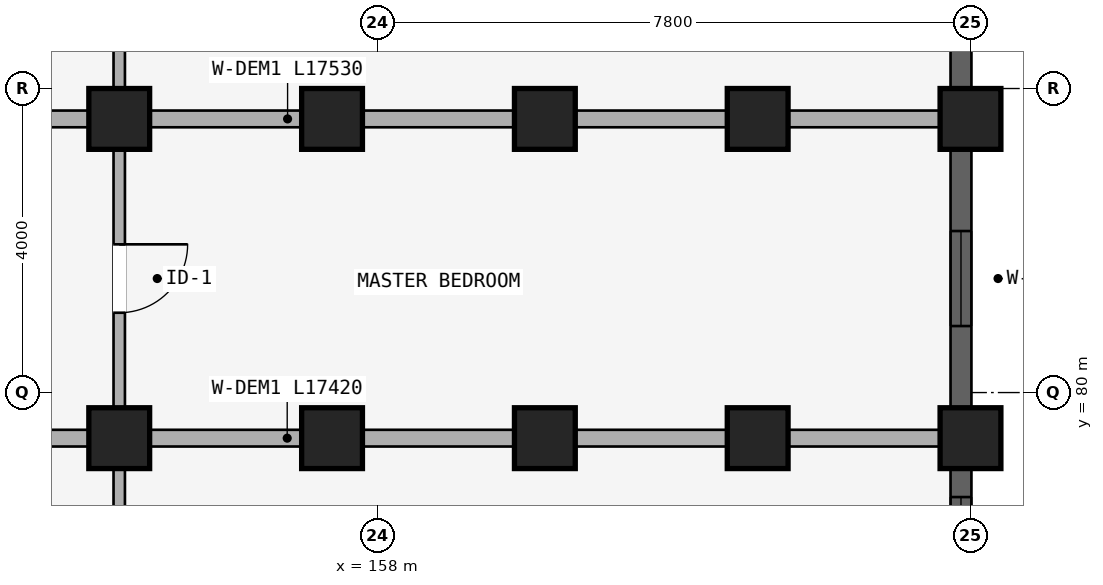
"""IFC4 building model, lengths in metres.
Left out: names, types, materials, properties, quantities, classifications, styles, units other than length and angle.
Written with IfcOpenShell. Run it as: python <this file> out.ifc"""

import sys

from ifc_helpers import new_model, si_unit, direction, frame, frame_2d, origin, origin_2d, place, context, subcontext, project, spatial, rectangle, extrude, element, fill, save


model = new_model("IFC4")
c1 = context("Model", 3, precision=1e-05, world=origin(), true_north=direction((0.0, 1.0)))
c2 = subcontext(c1, "Body", "Model", "MODEL_VIEW")
j1 = project(units=[si_unit("LENGTHUNIT", "METRE"), si_unit("PLANEANGLEUNIT", "RADIAN")], contexts=[c1])
p1 = place(None, origin())
s1 = spatial("IfcSite", under=j1, at=p1, CompositionType="ELEMENT")
p2 = place(p1, origin())
s2 = spatial("IfcBuilding", under=s1, at=p2, CompositionType="ELEMENT")
p3 = place(p2, frame((0.0, 0.0, 11.85)))
s3 = spatial("IfcBuildingStorey", under=s2, at=p3, CompositionType="ELEMENT", Elevation=11.85)
for number, where, z_axis, x_axis in (
    (1, (154.6, 83.6, 0.0), (0.0, 0.0, 1.0), (1.0, 0.0, 0.0)),
    (2, (157.4, 83.6, 0.0), (0.0, 0.0, 1.0), (1.0, 0.0, 0.0)),
    (3, (160.2, 83.6, 0.0), (0.0, 0.0, 1.0), (1.0, 0.0, 0.0)),
    (4, (163.0, 83.6, 0.0), (0.0, 0.0, 1.0), (1.0, 0.0, 0.0)),
    (5, (165.8, 83.6, 0.0), (0.0, 0.0, 1.0), (1.0, 0.0, 0.0)),
    (6, (154.6, 79.4, 0.0), (0.0, 0.0, 1.0), (1.0, 0.0, 0.0)),
    (7, (157.4, 79.4, 0.0), (0.0, 0.0, 1.0), (1.0, 0.0, 0.0)),
    (8, (160.2, 79.4, 0.0), (0.0, 0.0, 1.0), (1.0, 0.0, 0.0)),
    (9, (163.0, 79.4, 0.0), (0.0, 0.0, 1.0), (1.0, 0.0, 0.0)),
    (10, (165.8, 79.4, 0.0), (0.0, 0.0, 1.0), (1.0, 0.0, 0.0)),
):
    element("IfcColumn", number, at=place(p3, frame(where, z_axis=z_axis, x_axis=x_axis)), inside=s3, PredefinedType="COLUMN", context=c2, shape_type="SweptSolid", body=[
        extrude(rectangle(XDim=0.8, YDim=0.8, at=origin_2d()), origin(), (0.0, 0.0, 1.0), 2.93),
    ])
p4 = place(p3, frame((154.6, 87.57, 0.0), z_axis=(0.0, 0.0, 1.0), x_axis=(0.0, -1.0, 0.0)))
e11 = element("IfcWall", 11, at=p4, inside=s3, PredefinedType="PARTITIONING", context=c2, shape_type="SweptSolid", body=[
    extrude(rectangle(XDim=3.89, YDim=0.15, at=frame_2d((1.945, 0.0))), origin(), (0.0, 0.0, 1.0), 2.372),
])
p5 = place(p4, frame((1.495, 0.0, 0.0)))
e12 = element("IfcOpeningElement", 12, at=p5, cuts=e11, PredefinedType="OPENING", context=c2, shape_type="SweptSolid", body=[
    extrude(rectangle(XDim=0.9, YDim=2.1, at=frame_2d((0.45, 1.05))), frame((0.0, 0.085, 0.0), z_axis=(0.0, -1.0, 0.0), x_axis=(1.0, 0.0, 0.0)), (0.0, 0.0, 1.0), 0.17),
])
p6 = place(p3, frame((154.6, 83.52, 0.0), z_axis=(0.0, 0.0, 1.0), x_axis=(0.0, -1.0, 0.0)))
e13 = element("IfcWall", 13, at=p6, inside=s3, PredefinedType="PARTITIONING", context=c2, shape_type="SweptSolid", body=[
    extrude(rectangle(XDim=4.04, YDim=0.15, at=frame_2d((2.02, 0.0))), origin(), (0.0, 0.0, 1.0), 2.372),
])
p7 = place(p6, frame((1.57, 0.0, 0.0)))
e14 = element("IfcOpeningElement", 14, at=p7, cuts=e13, PredefinedType="OPENING", context=c2, shape_type="SweptSolid", body=[
    extrude(rectangle(XDim=0.9, YDim=2.1, at=frame_2d((0.45, 1.05))), frame((0.0, 0.085, 0.0), z_axis=(0.0, -1.0, 0.0), x_axis=(1.0, 0.0, 0.0)), (0.0, 0.0, 1.0), 0.17),
])
p8 = place(p3, frame((148.05, 83.6, 0.0), z_axis=(0.0, 0.0, 1.0), x_axis=(1.0, 0.0, 0.0)))
e15 = element("IfcWall", 15, at=p8, inside=s3, PredefinedType="STANDARD", context=c2, shape_type="SweptSolid", body=[
    extrude(rectangle(XDim=17.53, YDim=0.22, at=frame_2d((8.765, 0.0))), origin(), (0.0, 0.0, 1.0), 2.372),
])
p9 = place(p3, frame((154.6, 79.32, 0.0), z_axis=(0.0, 0.0, 1.0), x_axis=(0.0, -1.0, 0.0)))
e16 = element("IfcWall", 16, at=p9, inside=s3, PredefinedType="PLUMBINGWALL", context=c2, shape_type="SweptSolid", body=[
    extrude(rectangle(XDim=2.64, YDim=0.15, at=frame_2d((1.32, 0.0))), origin(), (0.0, 0.0, 1.0), 2.372),
])
p10 = place(p9, frame((0.87, 0.0, 0.0)))
e17 = element("IfcOpeningElement", 17, at=p10, cuts=e16, PredefinedType="OPENING", context=c2, shape_type="SweptSolid", body=[
    extrude(rectangle(XDim=0.9, YDim=2.1, at=frame_2d((0.45, 1.05))), frame((0.0, 0.085, 0.0), z_axis=(0.0, -1.0, 0.0), x_axis=(1.0, 0.0, 0.0)), (0.0, 0.0, 1.0), 0.17),
])
p11 = place(p3, frame((148.1, 79.4, 0.0), z_axis=(0.0, 0.0, 1.0), x_axis=(1.0, 0.0, 0.0)))
e18 = element("IfcWall", 18, at=p11, inside=s3, PredefinedType="STANDARD", context=c2, shape_type="SweptSolid", body=[
    extrude(rectangle(XDim=17.42, YDim=0.22, at=frame_2d((8.71, 0.0))), origin(), (0.0, 0.0, 1.0), 2.372),
])
p12 = place(p3, frame((165.675, 87.396, 0.0), z_axis=(0.0, 0.0, 1.0), x_axis=(0.0, -1.0, 0.0)))
e19 = element("IfcWall", 19, at=p12, inside=s3, PredefinedType="STANDARD", context=c2, shape_type="SweptSolid", body=[
    extrude(rectangle(XDim=3.393, YDim=0.275, at=frame_2d((1.697, 0.0))), origin(), (0.0, 0.0, 1.0), 2.472),
])
p13 = place(p12, frame((1.072, 0.0, 0.722)))
e20 = element("IfcOpeningElement", 20, at=p13, cuts=e19, PredefinedType="OPENING", context=c2, shape_type="SweptSolid", body=[
    extrude(rectangle(XDim=1.25, YDim=1.55, at=frame_2d((0.625, 0.775))), frame((0.0, 0.147, 0.0), z_axis=(0.0, -1.0, 0.0), x_axis=(1.0, 0.0, 0.0)), (0.0, 0.0, 1.0), 0.295),
])
p14 = place(p3, frame((165.675, 83.197, 0.0), z_axis=(0.0, 0.0, 1.0), x_axis=(0.0, -1.0, 0.0)))
e21 = element("IfcWall", 21, at=p14, inside=s3, PredefinedType="STANDARD", context=c2, shape_type="SweptSolid", body=[
    extrude(rectangle(XDim=3.393, YDim=0.275, at=frame_2d((1.697, 0.0))), origin(), (0.0, 0.0, 1.0), 2.472),
])
p15 = place(p14, frame((1.072, 0.0, 0.722)))
e22 = element("IfcOpeningElement", 22, at=p15, cuts=e21, PredefinedType="OPENING", context=c2, shape_type="SweptSolid", body=[
    extrude(rectangle(XDim=1.25, YDim=1.55, at=frame_2d((0.625, 0.775))), frame((0.0, 0.147, 0.0), z_axis=(0.0, -1.0, 0.0), x_axis=(1.0, 0.0, 0.0)), (0.0, 0.0, 1.0), 0.295),
])
p16 = place(p3, frame((165.675, 78.997, 0.0), z_axis=(0.0, 0.0, 1.0), x_axis=(0.0, -1.0, 0.0)))
e23 = element("IfcWall", 23, at=p16, inside=s3, PredefinedType="STANDARD", context=c2, shape_type="SweptSolid", body=[
    extrude(rectangle(XDim=1.993, YDim=0.275, at=frame_2d((0.997, 0.0))), origin(), (0.0, 0.0, 1.0), 2.472),
])
p17 = place(p16, frame((0.372, 0.0, 0.722)))
e24 = element("IfcOpeningElement", 24, at=p17, cuts=e23, PredefinedType="OPENING", context=c2, shape_type="SweptSolid", body=[
    extrude(rectangle(XDim=1.25, YDim=1.55, at=frame_2d((0.625, 0.775))), frame((0.0, 0.147, 0.0), z_axis=(0.0, -1.0, 0.0), x_axis=(1.0, 0.0, 0.0)), (0.0, 0.0, 1.0), 0.295),
])
p18 = place(p15, origin())
e25 = element("IfcWindow", 25, at=p18, inside=s3, PartitioningType="SINGLE_PANEL", PredefinedType="WINDOW", context=c2, shape_type="SweptSolid", body=[
    extrude(rectangle(XDim=1.25, YDim=1.55, at=frame_2d((0.625, 0.775))), frame((0.0, 0.03, 0.0), z_axis=(0.0, -1.0, 0.0), x_axis=(1.0, 0.0, 0.0)), (0.0, 0.0, 1.0), 0.06),
])
fill(e22, e25)
p19 = place(p17, origin())
e26 = element("IfcWindow", 26, at=p19, inside=s3, PartitioningType="SINGLE_PANEL", PredefinedType="WINDOW", context=c2, shape_type="SweptSolid", body=[
    extrude(rectangle(XDim=1.25, YDim=1.55, at=frame_2d((0.625, 0.775))), frame((0.0, 0.03, 0.0), z_axis=(0.0, -1.0, 0.0), x_axis=(1.0, 0.0, 0.0)), (0.0, 0.0, 1.0), 0.06),
])
fill(e24, e26)
p20 = place(p7, frame((0.9, 0.0, 0.0), z_axis=(0.0, 0.0, 1.0), x_axis=(-1.0, 0.0, 0.0)))
e27 = element("IfcDoor", 27, at=p20, inside=s3, OperationType="SINGLE_SWING_RIGHT", PredefinedType="DOOR", context=c2, shape_type="SweptSolid", body=[
    extrude(rectangle(XDim=0.9, YDim=2.1, at=frame_2d((0.45, 1.05))), frame((0.0, 0.025, 0.0), z_axis=(0.0, -1.0, 0.0), x_axis=(1.0, 0.0, 0.0)), (0.0, 0.0, 1.0), 0.05),
])
fill(e14, e27)
save(model, sys.argv[1])
